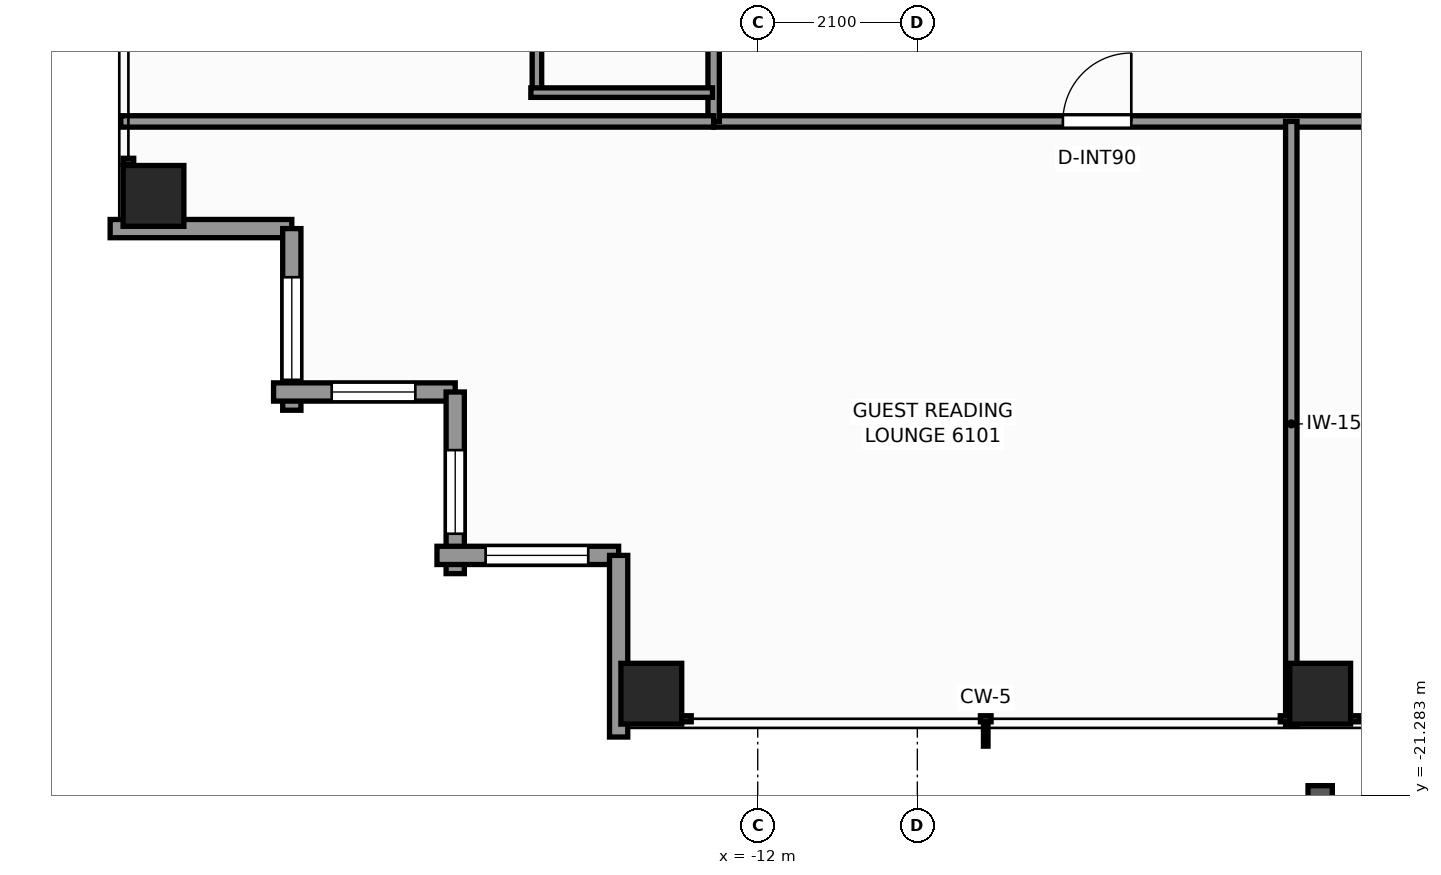
"""IFC4 building model, lengths in metres.
Left out: names, types, materials, properties, quantities, classifications, styles, units other than length and angle.
Written with IfcOpenShell. Run it as: python <this file> out.ifc"""

import sys

from ifc_helpers import new_model, si_unit, direction, frame, frame_2d, origin, origin_2d, place, context, subcontext, project, spatial, rectangle, extrude, element, fill, save


model = new_model("IFC4")
c1 = context("Model", 3, precision=1e-05, world=origin(), true_north=direction((0.0, 1.0)))
c2 = subcontext(c1, "Body", "Model", "MODEL_VIEW")
j1 = project(units=[si_unit("LENGTHUNIT", "METRE"), si_unit("PLANEANGLEUNIT", "RADIAN")], contexts=[c1])
p1 = place(None, origin())
s1 = spatial("IfcSite", under=j1, at=p1, CompositionType="ELEMENT")
p2 = place(p1, origin())
s2 = spatial("IfcBuilding", under=s1, at=p2, CompositionType="ELEMENT")
p3 = place(p2, frame((0.0, 0.0, 209.7)))
s3 = spatial("IfcBuildingStorey", under=s2, at=p3, CompositionType="ELEMENT", Elevation=209.7)
for number, where, z_axis, x_axis in (
    (1, (-13.4, -19.95, 0.0), (0.0, 0.0, 1.0), (1.0, 0.0, 0.0)),
    (2, (-4.6, -19.95, 0.0), (0.0, 0.0, 1.0), (1.0, 0.0, 0.0)),
    (3, (-19.95, -13.4, 0.0), (0.0, 0.0, 1.0), (1.0, 0.0, 0.0)),
):
    element("IfcColumn", number, at=place(p3, frame(where, z_axis=z_axis, x_axis=x_axis)), inside=s3, PredefinedType="COLUMN", context=c2, shape_type="SweptSolid", body=[
        extrude(rectangle(XDim=0.8, YDim=0.8, at=origin_2d()), origin(), (0.0, 0.0, 1.0), 3.3),
    ])
p4 = place(p3, frame((-18.13, -13.83, 0.0), z_axis=(0.0, 0.0, 1.0), x_axis=(-1.0, 0.0, 0.0)))
e4 = element("IfcWall", 4, at=p4, inside=s3, PredefinedType="STANDARD", context=c2, shape_type="SweptSolid", body=[
    extrude(rectangle(XDim=2.39, YDim=0.24, at=frame_2d((1.195, 0.0))), origin(), (0.0, 0.0, 1.0), 2.463),
])
p5 = place(p3, frame((-18.13, -16.22, 0.0), z_axis=(0.0, 0.0, 1.0), x_axis=(0.0, 1.0, 0.0)))
e5 = element("IfcWall", 5, at=p5, inside=s3, PredefinedType="STANDARD", context=c2, shape_type="SweptSolid", body=[
    extrude(rectangle(XDim=2.39, YDim=0.24, at=frame_2d((1.195, 0.0))), origin(), (0.0, 0.0, 1.0), 2.463),
])
p6 = place(p5, frame((0.4, 0.0, 0.65)))
e6 = element("IfcOpeningElement", 6, at=p6, cuts=e5, PredefinedType="OPENING", context=c2, shape_type="SweptSolid", body=[
    extrude(rectangle(XDim=1.35, YDim=1.55, at=frame_2d((0.675, 0.775))), frame((0.0, 0.13, 0.0), z_axis=(0.0, -1.0, 0.0), x_axis=(1.0, 0.0, 0.0)), (0.0, 0.0, 1.0), 0.26),
])
p7 = place(p3, frame((-15.98, -15.98, 0.0), z_axis=(0.0, 0.0, 1.0), x_axis=(-1.0, 0.0, 0.0)))
e7 = element("IfcWall", 7, at=p7, inside=s3, PredefinedType="STANDARD", context=c2, shape_type="SweptSolid", body=[
    extrude(rectangle(XDim=2.39, YDim=0.24, at=frame_2d((1.195, 0.0))), origin(), (0.0, 0.0, 1.0), 2.463),
])
p8 = place(p7, frame((0.525, 0.0, 0.65)))
e8 = element("IfcOpeningElement", 8, at=p8, cuts=e7, PredefinedType="OPENING", context=c2, shape_type="SweptSolid", body=[
    extrude(rectangle(XDim=1.1, YDim=1.45, at=frame_2d((0.55, 0.725))), frame((0.0, 0.13, 0.0), z_axis=(0.0, -1.0, 0.0), x_axis=(1.0, 0.0, 0.0)), (0.0, 0.0, 1.0), 0.26),
])
p9 = place(p3, frame((-15.98, -18.37, 0.0), z_axis=(0.0, 0.0, 1.0), x_axis=(0.0, 1.0, 0.0)))
e9 = element("IfcWall", 9, at=p9, inside=s3, PredefinedType="STANDARD", context=c2, shape_type="SweptSolid", body=[
    extrude(rectangle(XDim=2.39, YDim=0.24, at=frame_2d((1.195, 0.0))), origin(), (0.0, 0.0, 1.0), 2.463),
])
p10 = place(p9, frame((0.525, 0.0, 0.65)))
e10 = element("IfcOpeningElement", 10, at=p10, cuts=e9, PredefinedType="OPENING", context=c2, shape_type="SweptSolid", body=[
    extrude(rectangle(XDim=1.1, YDim=1.45, at=frame_2d((0.55, 0.725))), frame((0.0, 0.13, 0.0), z_axis=(0.0, -1.0, 0.0), x_axis=(1.0, 0.0, 0.0)), (0.0, 0.0, 1.0), 0.26),
])
p11 = place(p3, frame((-13.83, -18.13, 0.0), z_axis=(0.0, 0.0, 1.0), x_axis=(-1.0, 0.0, 0.0)))
e11 = element("IfcWall", 11, at=p11, inside=s3, PredefinedType="STANDARD", context=c2, shape_type="SweptSolid", body=[
    extrude(rectangle(XDim=2.39, YDim=0.24, at=frame_2d((1.195, 0.0))), origin(), (0.0, 0.0, 1.0), 2.463),
])
p12 = place(p11, frame((0.4, 0.0, 0.65)))
e12 = element("IfcOpeningElement", 12, at=p12, cuts=e11, PredefinedType="OPENING", context=c2, shape_type="SweptSolid", body=[
    extrude(rectangle(XDim=1.35, YDim=1.55, at=frame_2d((0.675, 0.775))), frame((0.0, 0.13, 0.0), z_axis=(0.0, -1.0, 0.0), x_axis=(1.0, 0.0, 0.0)), (0.0, 0.0, 1.0), 0.26),
])
p13 = place(p3, frame((-13.83, -20.52, 0.0), z_axis=(0.0, 0.0, 1.0), x_axis=(0.0, 1.0, 0.0)))
e13 = element("IfcWall", 13, at=p13, inside=s3, PredefinedType="STANDARD", context=c2, shape_type="SweptSolid", body=[
    extrude(rectangle(XDim=2.39, YDim=0.24, at=frame_2d((1.195, 0.0))), origin(), (0.0, 0.0, 1.0), 2.463),
])
p14 = place(p3, frame((-12.58, -12.42, 0.0), z_axis=(0.0, 0.0, 1.0), x_axis=(1.0, 0.0, 0.0)))
e14 = element("IfcWall", 14, at=p14, inside=s3, PredefinedType="PARTITIONING", context=c2, shape_type="SweptSolid", body=[
    extrude(rectangle(XDim=25.16, YDim=0.15, at=frame_2d((12.58, 0.0))), origin(), (0.0, 0.0, 1.0), 2.369),
])
p15 = place(p14, frame((4.595, 0.0, 0.0)))
e15 = element("IfcOpeningElement", 15, at=p15, cuts=e14, PredefinedType="OPENING", context=c2, shape_type="SweptSolid", body=[
    extrude(rectangle(XDim=0.9, YDim=2.06, at=frame_2d((0.45, 1.03))), frame((0.0, 0.085, 0.0), z_axis=(0.0, -1.0, 0.0), x_axis=(1.0, 0.0, 0.0)), (0.0, 0.0, 1.0), 0.17),
])
p16 = place(p14, frame((10.1, 0.0, 0.0)))
e16 = element("IfcOpeningElement", 16, at=p16, cuts=e14, PredefinedType="OPENING", context=c2, shape_type="SweptSolid", body=[
    extrude(rectangle(XDim=0.9, YDim=2.06, at=frame_2d((0.45, 1.03))), frame((0.0, 0.085, 0.0), z_axis=(0.0, -1.0, 0.0), x_axis=(1.0, 0.0, 0.0)), (0.0, 0.0, 1.0), 0.17),
])
p17 = place(p14, frame((20.079, 0.0, 0.0)))
e17 = element("IfcOpeningElement", 17, at=p17, cuts=e14, PredefinedType="OPENING", context=c2, shape_type="SweptSolid", body=[
    extrude(rectangle(XDim=0.9, YDim=2.06, at=frame_2d((0.45, 1.03))), frame((0.0, 0.085, 0.0), z_axis=(0.0, -1.0, 0.0), x_axis=(1.0, 0.0, 0.0)), (0.0, 0.0, 1.0), 0.17),
])
p18 = place(p3, frame((-12.58, -12.42, 0.0), z_axis=(0.0, 0.0, 1.0), x_axis=(0.0, 1.0, 0.0)))
e18 = element("IfcWall", 18, at=p18, inside=s3, PredefinedType="PARTITIONING", context=c2, shape_type="SweptSolid", body=[
    extrude(rectangle(XDim=24.84, YDim=0.15, at=frame_2d((12.42, 0.0))), origin(), (0.0, 0.0, 1.0), 2.369),
])
p19 = place(p18, frame((3.831, 0.0, 0.0)))
e19 = element("IfcOpeningElement", 19, at=p19, cuts=e18, PredefinedType="OPENING", context=c2, shape_type="SweptSolid", body=[
    extrude(rectangle(XDim=0.95, YDim=2.06, at=frame_2d((0.475, 1.03))), frame((0.0, 0.085, 0.0), z_axis=(0.0, -1.0, 0.0), x_axis=(1.0, 0.0, 0.0)), (0.0, 0.0, 1.0), 0.17),
])
p20 = place(p18, frame((9.915, 0.0, 0.0)))
e20 = element("IfcOpeningElement", 20, at=p20, cuts=e18, PredefinedType="OPENING", context=c2, shape_type="SweptSolid", body=[
    extrude(rectangle(XDim=0.95, YDim=2.06, at=frame_2d((0.475, 1.03))), frame((0.0, 0.085, 0.0), z_axis=(0.0, -1.0, 0.0), x_axis=(1.0, 0.0, 0.0)), (0.0, 0.0, 1.0), 0.17),
])
p21 = place(p18, frame((19.803, 0.0, 0.0)))
e21 = element("IfcOpeningElement", 21, at=p21, cuts=e18, PredefinedType="OPENING", context=c2, shape_type="SweptSolid", body=[
    extrude(rectangle(XDim=0.95, YDim=2.06, at=frame_2d((0.475, 1.03))), frame((0.0, 0.085, 0.0), z_axis=(0.0, -1.0, 0.0), x_axis=(1.0, 0.0, 0.0)), (0.0, 0.0, 1.0), 0.17),
])
p22 = place(p3, frame((-20.38, -12.42, 0.0), z_axis=(0.0, 0.0, 1.0), x_axis=(1.0, 0.0, 0.0)))
e22 = element("IfcWall", 22, at=p22, inside=s3, PredefinedType="PARTITIONING", context=c2, shape_type="SweptSolid", body=[
    extrude(rectangle(XDim=7.8, YDim=0.15, at=frame_2d((3.9, 0.0))), origin(), (0.0, 0.0, 1.0), 2.369),
])
p23 = place(p3, frame((-4.98, -20.38, 0.0), z_axis=(0.0, 0.0, 1.0), x_axis=(0.0, 1.0, 0.0)))
e23 = element("IfcWall", 23, at=p23, inside=s3, PredefinedType="PARTITIONING", context=c2, shape_type="SweptSolid", body=[
    extrude(rectangle(XDim=7.96, YDim=0.15, at=frame_2d((3.98, 0.0))), origin(), (0.0, 0.0, 1.0), 2.453),
])
p24 = place(p3, frame((-14.905, -12.101, 0.0), z_axis=(0.0, 0.0, 1.0), x_axis=(0.0, 1.0, 0.0)))
e24 = element("IfcWall", 24, at=p24, inside=s3, PredefinedType="PARTITIONING", context=c2, shape_type="SweptSolid", body=[
    extrude(rectangle(XDim=2.77, YDim=0.125, at=frame_2d((1.385, 0.0))), origin(), (0.0, 0.0, 1.0), 2.369),
])
p25 = place(p3, frame((-14.985, -12.041, 0.0), z_axis=(0.0, 0.0, 1.0), x_axis=(1.0, 0.0, 0.0)))
e25 = element("IfcWall", 25, at=p25, inside=s3, PredefinedType="PARTITIONING", context=c2, shape_type="SweptSolid", body=[
    extrude(rectangle(XDim=2.39, YDim=0.125, at=frame_2d((1.195, 0.0))), origin(), (0.0, 0.0, 1.0), 3.08),
])
p26 = place(p6, origin())
e26 = element("IfcWindow", 26, at=p26, inside=s3, PartitioningType="SINGLE_PANEL", PredefinedType="WINDOW", context=c2, shape_type="SweptSolid", body=[
    extrude(rectangle(XDim=1.35, YDim=1.55, at=frame_2d((0.675, 0.775))), frame((0.0, 0.03, 0.0), z_axis=(0.0, -1.0, 0.0), x_axis=(1.0, 0.0, 0.0)), (0.0, 0.0, 1.0), 0.06),
])
fill(e6, e26)
p27 = place(p8, origin())
e27 = element("IfcWindow", 27, at=p27, inside=s3, PartitioningType="SINGLE_PANEL", PredefinedType="WINDOW", context=c2, shape_type="SweptSolid", body=[
    extrude(rectangle(XDim=1.1, YDim=1.45, at=frame_2d((0.55, 0.725))), frame((0.0, 0.03, 0.0), z_axis=(0.0, -1.0, 0.0), x_axis=(1.0, 0.0, 0.0)), (0.0, 0.0, 1.0), 0.06),
])
fill(e8, e27)
p28 = place(p10, origin())
e28 = element("IfcWindow", 28, at=p28, inside=s3, PartitioningType="SINGLE_PANEL", PredefinedType="WINDOW", context=c2, shape_type="SweptSolid", body=[
    extrude(rectangle(XDim=1.1, YDim=1.45, at=frame_2d((0.55, 0.725))), frame((0.0, 0.03, 0.0), z_axis=(0.0, -1.0, 0.0), x_axis=(1.0, 0.0, 0.0)), (0.0, 0.0, 1.0), 0.06),
])
fill(e10, e28)
p29 = place(p12, origin())
e29 = element("IfcWindow", 29, at=p29, inside=s3, PartitioningType="SINGLE_PANEL", PredefinedType="WINDOW", context=c2, shape_type="SweptSolid", body=[
    extrude(rectangle(XDim=1.35, YDim=1.55, at=frame_2d((0.675, 0.775))), frame((0.0, 0.03, 0.0), z_axis=(0.0, -1.0, 0.0), x_axis=(1.0, 0.0, 0.0)), (0.0, 0.0, 1.0), 0.06),
])
fill(e12, e29)
p30 = place(p15, origin())
e30 = element("IfcDoor", 30, at=p30, inside=s3, OperationType="SINGLE_SWING_RIGHT", PredefinedType="DOOR", context=c2, shape_type="SweptSolid", body=[
    extrude(rectangle(XDim=0.9, YDim=2.06, at=frame_2d((0.45, 1.03))), frame((0.0, 0.025, 0.0), z_axis=(0.0, -1.0, 0.0), x_axis=(1.0, 0.0, 0.0)), (0.0, 0.0, 1.0), 0.05),
])
fill(e15, e30)
save(model, sys.argv[1])
